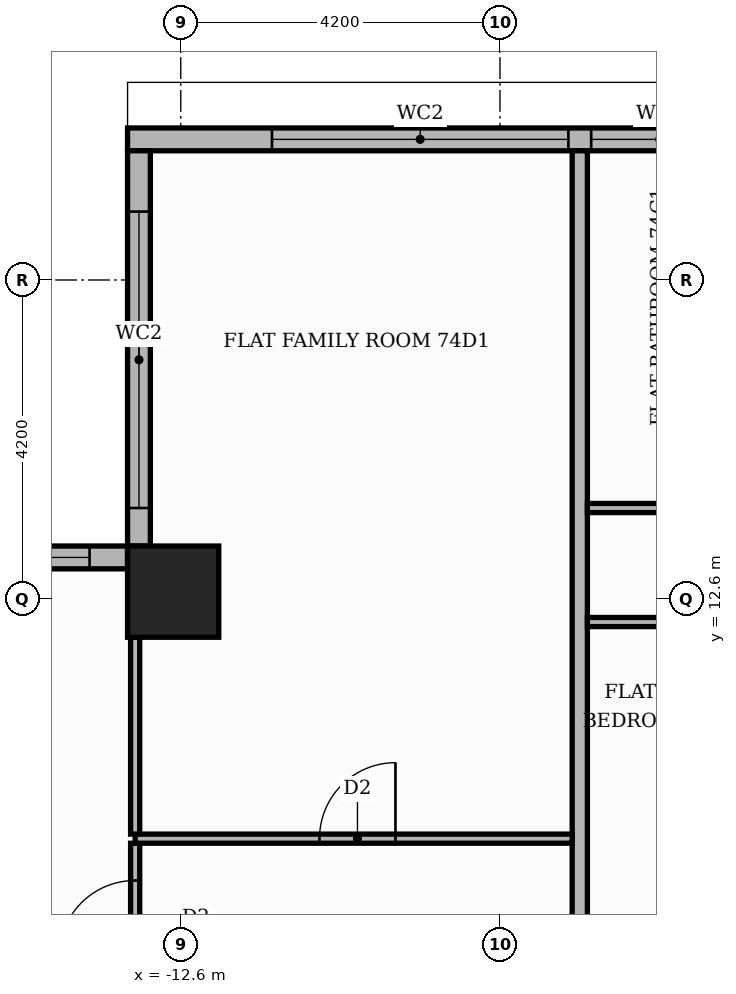
"""IFC4 building model, lengths in metres.
Left out: names, types, materials, properties, quantities, classifications, styles, units other than length and angle.
Written with IfcOpenShell. Run it as: python <this file> out.ifc"""

import sys

from ifc_helpers import new_model, si_unit, direction, frame, frame_2d, origin, origin_2d, place, context, subcontext, project, spatial, rectangle, extrude, element, fill, save


model = new_model("IFC4")
c1 = context("Model", 3, precision=1e-05, world=origin(), true_north=direction((0.0, 1.0)))
c2 = subcontext(c1, "Body", "Model", "MODEL_VIEW")
j1 = project(units=[si_unit("LENGTHUNIT", "METRE"), si_unit("PLANEANGLEUNIT", "RADIAN")], contexts=[c1])
p1 = place(None, origin())
s1 = spatial("IfcSite", under=j1, at=p1, CompositionType="ELEMENT")
p2 = place(p1, origin())
s2 = spatial("IfcBuilding", under=s1, at=p2, CompositionType="ELEMENT")
p3 = place(p2, frame((0.0, 0.0, 308.4)))
s3 = spatial("IfcBuildingStorey", under=s2, at=p3, CompositionType="ELEMENT", Elevation=308.4)
p4 = place(p3, frame((-12.7, 12.7, 0.0), z_axis=(0.0, 0.0, 1.0), x_axis=(1.0, 0.0, 0.0)))
e1 = element("IfcColumn", 1, at=p4, inside=s3, PredefinedType="COLUMN", context=c2, shape_type="SweptSolid", body=[
    extrude(rectangle(XDim=1.2, YDim=1.2, at=origin_2d()), origin(), (0.0, 0.0, 1.0), 3.9),
])
p5 = place(p3, frame((13.0, 18.65, 0.0), z_axis=(0.0, 0.0, 1.0), x_axis=(-1.0, 0.0, 0.0)))
e2 = element("IfcWall", 2, at=p5, inside=s3, PredefinedType="STANDARD", context=c2, shape_type="SweptSolid", body=[
    extrude(rectangle(XDim=26.3, YDim=0.3, at=frame_2d((13.15, 0.0))), origin(), (0.0, 0.0, 1.0), 3.55),
])
p6 = place(p5, frame((1.6, 0.0, 0.6)))
e3 = element("IfcOpeningElement", 3, at=p6, cuts=e2, PredefinedType="OPENING", context=c2, shape_type="SweptSolid", body=[
    extrude(rectangle(XDim=3.9, YDim=2.4, at=frame_2d((1.95, 1.2))), frame((0.0, 0.16, 0.0), z_axis=(0.0, -1.0, 0.0), x_axis=(1.0, 0.0, 0.0)), (0.0, 0.0, 1.0), 0.32),
])
p7 = place(p5, frame((5.8, 0.0, 0.6)))
e4 = element("IfcOpeningElement", 4, at=p7, cuts=e2, PredefinedType="OPENING", context=c2, shape_type="SweptSolid", body=[
    extrude(rectangle(XDim=6.0, YDim=2.4, at=frame_2d((3.0, 1.2))), frame((0.0, 0.16, 0.0), z_axis=(0.0, -1.0, 0.0), x_axis=(1.0, 0.0, 0.0)), (0.0, 0.0, 1.0), 0.32),
])
p8 = place(p5, frame((14.2, 0.0, 0.6)))
e5 = element("IfcOpeningElement", 5, at=p8, cuts=e2, PredefinedType="OPENING", context=c2, shape_type="SweptSolid", body=[
    extrude(rectangle(XDim=1.8, YDim=2.4, at=frame_2d((0.9, 1.2))), frame((0.0, 0.16, 0.0), z_axis=(0.0, -1.0, 0.0), x_axis=(1.0, 0.0, 0.0)), (0.0, 0.0, 1.0), 0.32),
])
p9 = place(p5, frame((16.3, 0.0, 0.6)))
e6 = element("IfcOpeningElement", 6, at=p9, cuts=e2, PredefinedType="OPENING", context=c2, shape_type="SweptSolid", body=[
    extrude(rectangle(XDim=1.8, YDim=2.4, at=frame_2d((0.9, 1.2))), frame((0.0, 0.16, 0.0), z_axis=(0.0, -1.0, 0.0), x_axis=(1.0, 0.0, 0.0)), (0.0, 0.0, 1.0), 0.32),
])
p10 = place(p5, frame((18.4, 0.0, 0.6)))
e7 = element("IfcOpeningElement", 7, at=p10, cuts=e2, PredefinedType="OPENING", context=c2, shape_type="SweptSolid", body=[
    extrude(rectangle(XDim=1.8, YDim=2.4, at=frame_2d((0.9, 1.2))), frame((0.0, 0.16, 0.0), z_axis=(0.0, -1.0, 0.0), x_axis=(1.0, 0.0, 0.0)), (0.0, 0.0, 1.0), 0.32),
])
p11 = place(p5, frame((20.5, 0.0, 0.6)))
e8 = element("IfcOpeningElement", 8, at=p11, cuts=e2, PredefinedType="OPENING", context=c2, shape_type="SweptSolid", body=[
    extrude(rectangle(XDim=3.9, YDim=2.4, at=frame_2d((1.95, 1.2))), frame((0.0, 0.16, 0.0), z_axis=(0.0, -1.0, 0.0), x_axis=(1.0, 0.0, 0.0)), (0.0, 0.0, 1.0), 0.32),
])
p12 = place(p5, frame((12.175, 0.0, 0.9)))
e9 = element("IfcOpeningElement", 9, at=p12, cuts=e2, PredefinedType="OPENING", context=c2, shape_type="SweptSolid", body=[
    extrude(rectangle(XDim=1.2, YDim=2.1, at=frame_2d((0.6, 1.05))), frame((0.0, 0.16, 0.0), z_axis=(0.0, -1.0, 0.0), x_axis=(1.0, 0.0, 0.0)), (0.0, 0.0, 1.0), 0.32),
])
p13 = place(p3, frame((-13.15, 18.5, 0.0), z_axis=(0.0, 0.0, 1.0), x_axis=(0.0, -1.0, 0.0)))
e10 = element("IfcWall", 10, at=p13, inside=s3, PredefinedType="STANDARD", context=c2, shape_type="SweptSolid", body=[
    extrude(rectangle(XDim=5.2, YDim=0.3, at=frame_2d((2.6, 0.0))), origin(), (0.0, 0.0, 1.0), 3.55),
])
p14 = place(p13, frame((0.8, 0.0, 0.6)))
e11 = element("IfcOpeningElement", 11, at=p14, cuts=e10, PredefinedType="OPENING", context=c2, shape_type="SweptSolid", body=[
    extrude(rectangle(XDim=3.9, YDim=2.4, at=frame_2d((1.95, 1.2))), frame((0.0, 0.16, 0.0), z_axis=(0.0, -1.0, 0.0), x_axis=(1.0, 0.0, 0.0)), (0.0, 0.0, 1.0), 0.32),
])
p15 = place(p3, frame((-13.3, 13.15, 0.0), z_axis=(0.0, 0.0, 1.0), x_axis=(-1.0, 0.0, 0.0)))
e12 = element("IfcWall", 12, at=p15, inside=s3, PredefinedType="STANDARD", context=c2, shape_type="SweptSolid", body=[
    extrude(rectangle(XDim=5.5, YDim=0.3, at=frame_2d((2.75, 0.0))), origin(), (0.0, 0.0, 1.0), 3.55),
])
p16 = place(p15, frame((0.5, 0.0, 0.6)))
e13 = element("IfcOpeningElement", 13, at=p16, cuts=e12, PredefinedType="OPENING", context=c2, shape_type="SweptSolid", body=[
    extrude(rectangle(XDim=3.9, YDim=2.4, at=frame_2d((1.95, 1.2))), frame((0.0, 0.16, 0.0), z_axis=(0.0, -1.0, 0.0), x_axis=(1.0, 0.0, 0.0)), (0.0, 0.0, 1.0), 0.32),
])
p17 = place(p3, frame((-13.2, 7.41, 0.0), z_axis=(0.0, 0.0, 1.0), x_axis=(0.0, 1.0, 0.0)))
e14 = element("IfcWall", 14, at=p17, inside=s3, PredefinedType="PARTITIONING", context=c2, shape_type="SweptSolid", body=[
    extrude(rectangle(XDim=1.98, YDim=0.12, at=frame_2d((0.99, 0.0))), origin(), (0.0, 0.0, 1.0), 3.55),
])
p18 = place(p17, frame((0.49, 0.0, 0.0)))
e15 = element("IfcOpeningElement", 15, at=p18, cuts=e14, PredefinedType="OPENING", context=c2, shape_type="SweptSolid", body=[
    extrude(rectangle(XDim=1.0, YDim=2.1, at=frame_2d((0.5, 1.05))), frame((0.0, 0.07, 0.0), z_axis=(0.0, -1.0, 0.0), x_axis=(1.0, 0.0, 0.0)), (0.0, 0.0, 1.0), 0.14),
])
p19 = place(p3, frame((-7.35, 7.45, 0.0), z_axis=(0.0, 0.0, 1.0), x_axis=(0.0, 1.0, 0.0)))
e16 = element("IfcWall", 16, at=p19, inside=s3, PredefinedType="PARTITIONING", context=c2, shape_type="SweptSolid", body=[
    extrude(rectangle(XDim=11.05, YDim=0.2, at=frame_2d((5.525, 0.0))), origin(), (0.0, 0.0, 1.0), 3.55),
])
p20 = place(p3, frame((-13.2, 9.45, 0.0), z_axis=(0.0, 0.0, 1.0), x_axis=(1.0, 0.0, 0.0)))
e17 = element("IfcWall", 17, at=p20, inside=s3, PredefinedType="PARTITIONING", context=c2, shape_type="SweptSolid", body=[
    extrude(rectangle(XDim=5.75, YDim=0.12, at=frame_2d((2.875, 0.0))), origin(), (0.0, 0.0, 1.0), 3.55),
])
p21 = place(p20, frame((2.425, 0.0, 0.0)))
e18 = element("IfcOpeningElement", 18, at=p21, cuts=e17, PredefinedType="OPENING", context=c2, shape_type="SweptSolid", body=[
    extrude(rectangle(XDim=1.0, YDim=2.1, at=frame_2d((0.5, 1.05))), frame((0.0, 0.07, 0.0), z_axis=(0.0, -1.0, 0.0), x_axis=(1.0, 0.0, 0.0)), (0.0, 0.0, 1.0), 0.14),
])
p22 = place(p3, frame((-13.2, 9.51, 0.0), z_axis=(0.0, 0.0, 1.0), x_axis=(0.0, 1.0, 0.0)))
e19 = element("IfcWall", 19, at=p22, inside=s3, PredefinedType="PARTITIONING", context=c2, shape_type="SweptSolid", body=[
    extrude(rectangle(XDim=2.59, YDim=0.12, at=frame_2d((1.295, 0.0))), origin(), (0.0, 0.0, 1.0), 3.55),
])
p23 = place(p3, frame((-7.25, 12.3, 0.0), z_axis=(0.0, 0.0, 1.0), x_axis=(1.0, 0.0, 0.0)))
e20 = element("IfcWall", 20, at=p23, inside=s3, PredefinedType="PARTITIONING", context=c2, shape_type="SweptSolid", body=[
    extrude(rectangle(XDim=10.4, YDim=0.12, at=frame_2d((5.2, 0.0))), origin(), (0.0, 0.0, 1.0), 3.55),
])
p24 = place(p23, frame((4.55, 0.0, 0.0)))
e21 = element("IfcOpeningElement", 21, at=p24, cuts=e20, PredefinedType="OPENING", context=c2, shape_type="SweptSolid", body=[
    extrude(rectangle(XDim=0.9, YDim=2.1, at=frame_2d((0.45, 1.05))), frame((0.0, 0.07, 0.0), z_axis=(0.0, -1.0, 0.0), x_axis=(1.0, 0.0, 0.0)), (0.0, 0.0, 1.0), 0.14),
])
p25 = place(p23, frame((1.4, 0.0, 0.0)))
e22 = element("IfcOpeningElement", 22, at=p25, cuts=e20, PredefinedType="OPENING", context=c2, shape_type="SweptSolid", body=[
    extrude(rectangle(XDim=0.9, YDim=2.1, at=frame_2d((0.45, 1.05))), frame((0.0, 0.07, 0.0), z_axis=(0.0, -1.0, 0.0), x_axis=(1.0, 0.0, 0.0)), (0.0, 0.0, 1.0), 0.14),
])
p26 = place(p3, frame((-7.25, 13.8, 0.0), z_axis=(0.0, 0.0, 1.0), x_axis=(1.0, 0.0, 0.0)))
e23 = element("IfcWall", 23, at=p26, inside=s3, PredefinedType="PARTITIONING", context=c2, shape_type="SweptSolid", body=[
    extrude(rectangle(XDim=19.349, YDim=0.12, at=frame_2d((9.675, 0.0))), origin(), (0.0, 0.0, 1.0), 3.55),
])
p27 = place(p26, frame((15.15, 0.0, 0.0)))
e24 = element("IfcOpeningElement", 24, at=p27, cuts=e23, PredefinedType="OPENING", context=c2, shape_type="SweptSolid", body=[
    extrude(rectangle(XDim=1.0, YDim=2.1, at=frame_2d((0.5, 1.05))), frame((0.0, 0.07, 0.0), z_axis=(0.0, -1.0, 0.0), x_axis=(1.0, 0.0, 0.0)), (0.0, 0.0, 1.0), 0.14),
])
p28 = place(p26, frame((10.95, 0.0, 0.0)))
e25 = element("IfcOpeningElement", 25, at=p28, cuts=e23, PredefinedType="OPENING", context=c2, shape_type="SweptSolid", body=[
    extrude(rectangle(XDim=1.0, YDim=2.1, at=frame_2d((0.5, 1.05))), frame((0.0, 0.07, 0.0), z_axis=(0.0, -1.0, 0.0), x_axis=(1.0, 0.0, 0.0)), (0.0, 0.0, 1.0), 0.14),
])
p29 = place(p26, frame((5.75, 0.0, 0.0)))
e26 = element("IfcOpeningElement", 26, at=p29, cuts=e23, PredefinedType="OPENING", context=c2, shape_type="SweptSolid", body=[
    extrude(rectangle(XDim=0.9, YDim=2.1, at=frame_2d((0.45, 1.05))), frame((0.0, 0.07, 0.0), z_axis=(0.0, -1.0, 0.0), x_axis=(1.0, 0.0, 0.0)), (0.0, 0.0, 1.0), 0.14),
])
p30 = place(p10, origin())
e27 = element("IfcWindow", 27, at=p30, inside=s3, PartitioningType="SINGLE_PANEL", PredefinedType="WINDOW", context=c2, shape_type="SweptSolid", body=[
    extrude(rectangle(XDim=1.8, YDim=2.4, at=frame_2d((0.9, 1.2))), frame((0.0, 0.03, 0.0), z_axis=(0.0, -1.0, 0.0), x_axis=(1.0, 0.0, 0.0)), (0.0, 0.0, 1.0), 0.06),
])
fill(e7, e27)
p31 = place(p11, origin())
e28 = element("IfcWindow", 28, at=p31, inside=s3, PartitioningType="SINGLE_PANEL", PredefinedType="WINDOW", context=c2, shape_type="SweptSolid", body=[
    extrude(rectangle(XDim=3.9, YDim=2.4, at=frame_2d((1.95, 1.2))), frame((0.0, 0.03, 0.0), z_axis=(0.0, -1.0, 0.0), x_axis=(1.0, 0.0, 0.0)), (0.0, 0.0, 1.0), 0.06),
])
fill(e8, e28)
p32 = place(p14, origin())
e29 = element("IfcWindow", 29, at=p32, inside=s3, PartitioningType="SINGLE_PANEL", PredefinedType="WINDOW", context=c2, shape_type="SweptSolid", body=[
    extrude(rectangle(XDim=3.9, YDim=2.4, at=frame_2d((1.95, 1.2))), frame((0.0, 0.03, 0.0), z_axis=(0.0, -1.0, 0.0), x_axis=(1.0, 0.0, 0.0)), (0.0, 0.0, 1.0), 0.06),
])
fill(e11, e29)
p33 = place(p16, origin())
e30 = element("IfcWindow", 30, at=p33, inside=s3, PartitioningType="SINGLE_PANEL", PredefinedType="WINDOW", context=c2, shape_type="SweptSolid", body=[
    extrude(rectangle(XDim=3.9, YDim=2.4, at=frame_2d((1.95, 1.2))), frame((0.0, 0.03, 0.0), z_axis=(0.0, -1.0, 0.0), x_axis=(1.0, 0.0, 0.0)), (0.0, 0.0, 1.0), 0.06),
])
fill(e13, e30)
p34 = place(p21, origin())
e31 = element("IfcDoor", 31, at=p34, inside=s3, OperationType="SINGLE_SWING_RIGHT", PredefinedType="DOOR", context=c2, shape_type="SweptSolid", body=[
    extrude(rectangle(XDim=1.0, YDim=2.1, at=frame_2d((0.5, 1.05))), frame((0.0, 0.025, 0.0), z_axis=(0.0, -1.0, 0.0), x_axis=(1.0, 0.0, 0.0)), (0.0, 0.0, 1.0), 0.05),
])
fill(e18, e31)
p35 = place(p18, origin())
e32 = element("IfcDoor", 32, at=p35, inside=s3, OperationType="SINGLE_SWING_LEFT", PredefinedType="DOOR", context=c2, shape_type="SweptSolid", body=[
    extrude(rectangle(XDim=1.0, YDim=2.1, at=frame_2d((0.5, 1.05))), frame((0.0, 0.025, 0.0), z_axis=(0.0, -1.0, 0.0), x_axis=(1.0, 0.0, 0.0)), (0.0, 0.0, 1.0), 0.05),
])
fill(e15, e32)
save(model, sys.argv[1])
